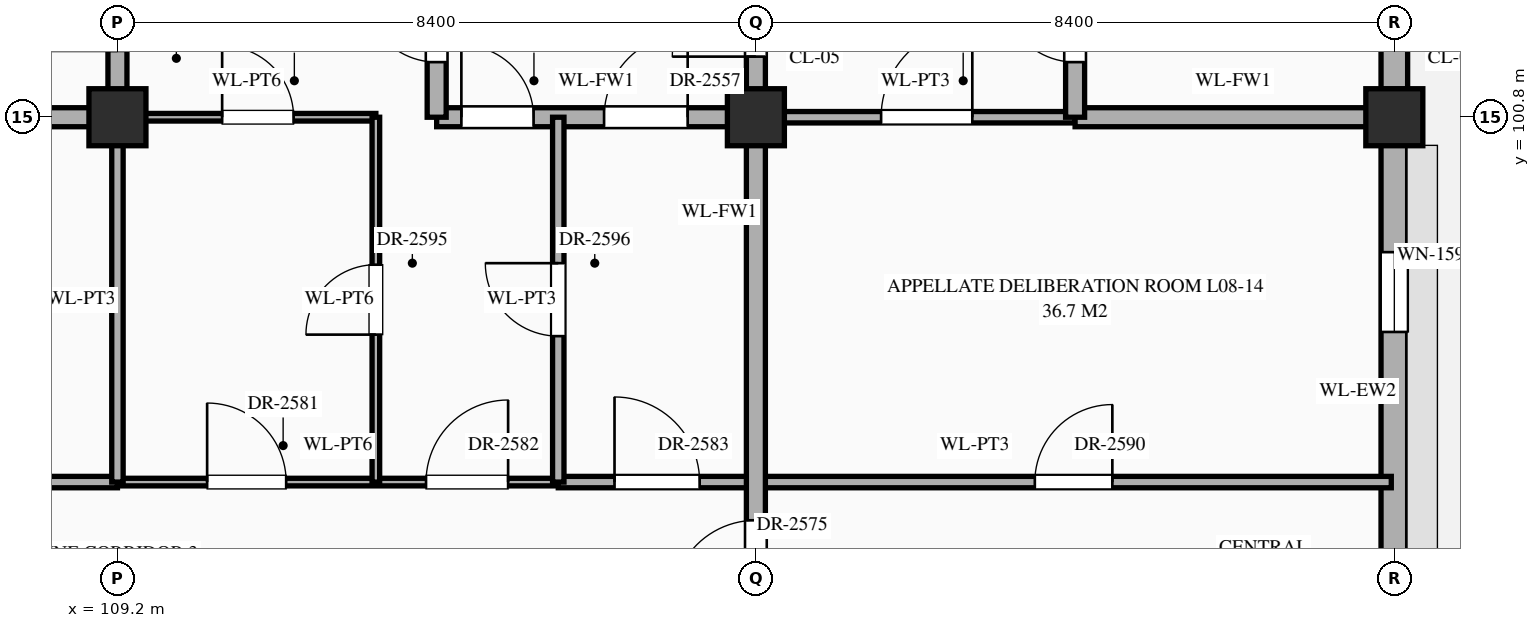
"""IFC4 building model, lengths in metres.
Left out: names, types, materials, properties, quantities, classifications, styles, units other than length and angle.
Written with IfcOpenShell. Run it as: python <this file> out.ifc"""

import sys

from ifc_helpers import new_model, si_unit, direction, frame, frame_2d, origin, origin_2d, place, context, subcontext, project, spatial, rectangle, extrude, element, fill, save


model = new_model("IFC4")
c1 = context("Model", 3, precision=1e-05, world=origin(), true_north=direction((0.0, 1.0)))
c2 = subcontext(c1, "Body", "Model", "MODEL_VIEW")
j1 = project(units=[si_unit("LENGTHUNIT", "METRE"), si_unit("PLANEANGLEUNIT", "RADIAN")], contexts=[c1])
p1 = place(None, origin())
s1 = spatial("IfcSite", under=j1, at=p1, CompositionType="ELEMENT")
p2 = place(p1, origin())
s2 = spatial("IfcBuilding", under=s1, at=p2, CompositionType="ELEMENT")
p3 = place(p2, frame((0.0, 0.0, 35.1)))
s3 = spatial("IfcBuildingStorey", under=s2, at=p3, CompositionType="ELEMENT", Elevation=35.1)
for number, where, z_axis, x_axis in (
    (1, (109.2, 100.8, 0.0), (0.0, 0.0, 1.0), (1.0, 0.0, 0.0)),
    (2, (117.6, 100.8, 0.0), (0.0, 0.0, 1.0), (1.0, 0.0, 0.0)),
    (3, (126.0, 100.8, 0.0), (0.0, 0.0, 1.0), (1.0, 0.0, 0.0)),
):
    element("IfcColumn", number, at=place(p3, frame(where, z_axis=z_axis, x_axis=x_axis)), inside=s3, PredefinedType="COLUMN", context=c2, shape_type="SweptSolid", body=[
        extrude(rectangle(XDim=0.75, YDim=0.75, at=origin_2d()), origin(), (0.0, 0.0, 1.0), 4.2),
    ])
p4 = place(p3, frame((126.0, 93.97, 0.0), z_axis=(0.0, 0.0, 1.0), x_axis=(0.0, 1.0, 0.0)))
e4 = element("IfcWall", 4, at=p4, inside=s3, PredefinedType="STANDARD", context=c2, shape_type="SweptSolid", body=[
    extrude(rectangle(XDim=6.46, YDim=0.35, at=frame_2d((3.23, 0.0))), origin(), (0.0, 0.0, 1.0), 3.3),
])
p5 = place(p4, frame((4.005, 0.0, 0.85)))
e5 = element("IfcOpeningElement", 5, at=p5, cuts=e4, PredefinedType="OPENING", context=c2, shape_type="SweptSolid", body=[
    extrude(rectangle(XDim=1.05, YDim=1.56, at=frame_2d((0.525, 0.78))), frame((0.0, 0.187, 0.0), z_axis=(0.0, -1.0, 0.0), x_axis=(1.0, 0.0, 0.0)), (0.0, 0.0, 1.0), 0.374),
])
p6 = place(p3, frame((126.0, 101.17, 0.0), z_axis=(0.0, 0.0, 1.0), x_axis=(0.0, 1.0, 0.0)))
e6 = element("IfcWall", 6, at=p6, inside=s3, PredefinedType="STANDARD", context=c2, shape_type="SweptSolid", body=[
    extrude(rectangle(XDim=6.46, YDim=0.35, at=frame_2d((3.23, 0.0))), origin(), (0.0, 0.0, 1.0), 3.3),
])
p7 = place(p3, frame((89.8, 96.0, 0.0), z_axis=(0.0, 0.0, 1.0), x_axis=(1.0, 0.0, 0.0)))
e7 = element("IfcWall", 7, at=p7, inside=s3, PredefinedType="STANDARD", context=c2, shape_type="SweptSolid", body=[
    extrude(rectangle(XDim=19.4, YDim=0.15, at=frame_2d((9.7, 0.0))), origin(), (0.0, 0.0, 1.0), 3.95),
])
p8 = place(p7, frame((0.84, 0.0, 0.0)))
e8 = element("IfcOpeningElement", 8, at=p8, cuts=e7, PredefinedType="OPENING", context=c2, shape_type="SweptSolid", body=[
    extrude(rectangle(XDim=0.92, YDim=2.15, at=frame_2d((0.46, 1.075))), frame((0.0, 0.087, 0.0), z_axis=(0.0, -1.0, 0.0), x_axis=(1.0, 0.0, 0.0)), (0.0, 0.0, 1.0), 0.174),
])
p9 = place(p7, frame((6.32, 0.0, 0.0)))
e9 = element("IfcOpeningElement", 9, at=p9, cuts=e7, PredefinedType="OPENING", context=c2, shape_type="SweptSolid", body=[
    extrude(rectangle(XDim=0.96, YDim=2.2, at=frame_2d((0.48, 1.1))), frame((0.0, 0.087, 0.0), z_axis=(0.0, -1.0, 0.0), x_axis=(1.0, 0.0, 0.0)), (0.0, 0.0, 1.0), 0.174),
])
p10 = place(p7, frame((14.7, 0.0, 0.0)))
e10 = element("IfcOpeningElement", 10, at=p10, cuts=e7, PredefinedType="OPENING", context=c2, shape_type="SweptSolid", body=[
    extrude(rectangle(XDim=1.0, YDim=2.25, at=frame_2d((0.5, 1.125))), frame((0.0, 0.087, 0.0), z_axis=(0.0, -1.0, 0.0), x_axis=(1.0, 0.0, 0.0)), (0.0, 0.0, 1.0), 0.174),
])
p11 = place(p3, frame((109.2, 96.0, 0.0), z_axis=(0.0, 0.0, 1.0), x_axis=(1.0, 0.0, 0.0)))
e11 = element("IfcWall", 11, at=p11, inside=s3, PredefinedType="STANDARD", context=c2, shape_type="SweptSolid", body=[
    extrude(rectangle(XDim=5.8, YDim=0.1, at=frame_2d((2.9, 0.0))), origin(), (0.0, 0.0, 1.0), 3.95),
])
p12 = place(p11, frame((1.18, 0.0, 0.0)))
e12 = element("IfcOpeningElement", 12, at=p12, cuts=e11, PredefinedType="OPENING", context=c2, shape_type="SweptSolid", body=[
    extrude(rectangle(XDim=1.04, YDim=2.2, at=frame_2d((0.52, 1.1))), frame((0.0, 0.062, 0.0), z_axis=(0.0, -1.0, 0.0), x_axis=(1.0, 0.0, 0.0)), (0.0, 0.0, 1.0), 0.124),
])
p13 = place(p11, frame((4.06, 0.0, 0.0)))
e13 = element("IfcOpeningElement", 13, at=p13, cuts=e11, PredefinedType="OPENING", context=c2, shape_type="SweptSolid", body=[
    extrude(rectangle(XDim=1.08, YDim=2.25, at=frame_2d((0.54, 1.125))), frame((0.0, 0.062, 0.0), z_axis=(0.0, -1.0, 0.0), x_axis=(1.0, 0.0, 0.0)), (0.0, 0.0, 1.0), 0.124),
])
p14 = place(p3, frame((115.0, 96.0, 0.0), z_axis=(0.0, 0.0, 1.0), x_axis=(1.0, 0.0, 0.0)))
e14 = element("IfcWall", 14, at=p14, inside=s3, PredefinedType="STANDARD", context=c2, shape_type="SweptSolid", body=[
    extrude(rectangle(XDim=10.96, YDim=0.15, at=frame_2d((5.48, 0.0))), origin(), (0.0, 0.0, 1.0), 3.95),
])
p15 = place(p14, frame((0.74, 0.0, 0.0)))
e15 = element("IfcOpeningElement", 15, at=p15, cuts=e14, PredefinedType="OPENING", context=c2, shape_type="SweptSolid", body=[
    extrude(rectangle(XDim=1.12, YDim=2.25, at=frame_2d((0.56, 1.125))), frame((0.0, 0.087, 0.0), z_axis=(0.0, -1.0, 0.0), x_axis=(1.0, 0.0, 0.0)), (0.0, 0.0, 1.0), 0.174),
])
p16 = place(p14, frame((6.27, 0.0, 0.0)))
e16 = element("IfcOpeningElement", 16, at=p16, cuts=e14, PredefinedType="OPENING", context=c2, shape_type="SweptSolid", body=[
    extrude(rectangle(XDim=1.02, YDim=2.4, at=frame_2d((0.51, 1.2))), frame((0.0, 0.087, 0.0), z_axis=(0.0, -1.0, 0.0), x_axis=(1.0, 0.0, 0.0)), (0.0, 0.0, 1.0), 0.174),
])
p17 = place(p3, frame((96.6, 100.8, 0.0), z_axis=(0.0, 0.0, 1.0), x_axis=(1.0, 0.0, 0.0)))
e17 = element("IfcWall", 17, at=p17, inside=s3, PredefinedType="STANDARD", context=c2, shape_type="SweptSolid", body=[
    extrude(rectangle(XDim=12.6, YDim=0.25, at=frame_2d((6.3, 0.0))), origin(), (0.0, 0.0, 1.0), 3.1),
])
p18 = place(p17, frame((7.85, 0.0, 0.0)))
e18 = element("IfcOpeningElement", 18, at=p18, cuts=e17, PredefinedType="OPENING", context=c2, shape_type="SweptSolid", body=[
    extrude(rectangle(XDim=1.1, YDim=2.2, at=frame_2d((0.55, 1.1))), frame((0.0, 0.137, 0.0), z_axis=(0.0, -1.0, 0.0), x_axis=(1.0, 0.0, 0.0)), (0.0, 0.0, 1.0), 0.274),
])
p19 = place(p3, frame((109.2, 100.8, 0.0), z_axis=(0.0, 0.0, 1.0), x_axis=(1.0, 0.0, 0.0)))
e19 = element("IfcWall", 19, at=p19, inside=s3, PredefinedType="STANDARD", context=c2, shape_type="SweptSolid", body=[
    extrude(rectangle(XDim=3.4, YDim=0.1, at=frame_2d((1.7, 0.0))), origin(), (0.0, 0.0, 1.0), 3.1),
])
p20 = place(p19, frame((1.377, 0.0, 0.0)))
e20 = element("IfcOpeningElement", 20, at=p20, cuts=e19, PredefinedType="OPENING", context=c2, shape_type="SweptSolid", body=[
    extrude(rectangle(XDim=0.94, YDim=2.3, at=frame_2d((0.47, 1.15))), frame((0.0, 0.062, 0.0), z_axis=(0.0, -1.0, 0.0), x_axis=(1.0, 0.0, 0.0)), (0.0, 0.0, 1.0), 0.124),
])
p21 = place(p3, frame((113.4, 100.8, 0.0), z_axis=(0.0, 0.0, 1.0), x_axis=(1.0, 0.0, 0.0)))
e21 = element("IfcWall", 21, at=p21, inside=s3, PredefinedType="STANDARD", context=c2, shape_type="SweptSolid", body=[
    extrude(rectangle(XDim=4.2, YDim=0.25, at=frame_2d((2.1, 0.0))), origin(), (0.0, 0.0, 1.0), 3.1),
])
p22 = place(p21, frame((0.325, 0.0, 0.0)))
e22 = element("IfcOpeningElement", 22, at=p22, cuts=e21, PredefinedType="OPENING", context=c2, shape_type="SweptSolid", body=[
    extrude(rectangle(XDim=0.95, YDim=2.15, at=frame_2d((0.475, 1.075))), frame((0.0, 0.137, 0.0), z_axis=(0.0, -1.0, 0.0), x_axis=(1.0, 0.0, 0.0)), (0.0, 0.0, 1.0), 0.274),
])
p23 = place(p21, frame((2.202, 0.0, 0.0)))
e23 = element("IfcOpeningElement", 23, at=p23, cuts=e21, PredefinedType="OPENING", context=c2, shape_type="SweptSolid", body=[
    extrude(rectangle(XDim=1.1, YDim=2.2, at=frame_2d((0.55, 1.1))), frame((0.0, 0.137, 0.0), z_axis=(0.0, -1.0, 0.0), x_axis=(1.0, 0.0, 0.0)), (0.0, 0.0, 1.0), 0.274),
])
p24 = place(p3, frame((117.6, 100.8, 0.0), z_axis=(0.0, 0.0, 1.0), x_axis=(1.0, 0.0, 0.0)))
e24 = element("IfcWall", 24, at=p24, inside=s3, PredefinedType="STANDARD", context=c2, shape_type="SweptSolid", body=[
    extrude(rectangle(XDim=4.2, YDim=0.15, at=frame_2d((2.1, 0.0))), origin(), (0.0, 0.0, 1.0), 3.1),
])
p25 = place(p24, frame((1.647, 0.0, 0.0)))
e25 = element("IfcOpeningElement", 25, at=p25, cuts=e24, PredefinedType="OPENING", context=c2, shape_type="SweptSolid", body=[
    extrude(rectangle(XDim=1.2, YDim=2.35, at=frame_2d((0.6, 1.175))), frame((0.0, 0.087, 0.0), z_axis=(0.0, -1.0, 0.0), x_axis=(1.0, 0.0, 0.0)), (0.0, 0.0, 1.0), 0.174),
])
p26 = place(p3, frame((121.8, 100.8, 0.0), z_axis=(0.0, 0.0, 1.0), x_axis=(1.0, 0.0, 0.0)))
e26 = element("IfcWall", 26, at=p26, inside=s3, PredefinedType="STANDARD", context=c2, shape_type="SweptSolid", body=[
    extrude(rectangle(XDim=4.16, YDim=0.25, at=frame_2d((2.08, 0.0))), origin(), (0.0, 0.0, 1.0), 3.1),
])
p27 = place(p3, frame((109.2, 96.0, 0.0), z_axis=(0.0, 0.0, 1.0), x_axis=(0.0, 1.0, 0.0)))
e27 = element("IfcWall", 27, at=p27, inside=s3, PredefinedType="STANDARD", context=c2, shape_type="SweptSolid", body=[
    extrude(rectangle(XDim=4.8, YDim=0.15, at=frame_2d((2.4, 0.0))), origin(), (0.0, 0.0, 1.0), 3.2),
])
p28 = place(p3, frame((109.2, 100.8, 0.0), z_axis=(0.0, 0.0, 1.0), x_axis=(0.0, 1.0, 0.0)))
e28 = element("IfcWall", 28, at=p28, inside=s3, PredefinedType="STANDARD", context=c2, shape_type="SweptSolid", body=[
    extrude(rectangle(XDim=2.4, YDim=0.25, at=frame_2d((1.2, 0.0))), origin(), (0.0, 0.0, 1.0), 3.2),
])
p29 = place(p28, frame((0.873, 0.0, 0.0)))
e29 = element("IfcOpeningElement", 29, at=p29, cuts=e28, PredefinedType="OPENING", context=c2, shape_type="SweptSolid", body=[
    extrude(rectangle(XDim=0.95, YDim=2.15, at=frame_2d((0.475, 1.075))), frame((0.0, 0.137, 0.0), z_axis=(0.0, -1.0, 0.0), x_axis=(1.0, 0.0, 0.0)), (0.0, 0.0, 1.0), 0.274),
])
p30 = place(p3, frame((112.6, 96.0, 0.0), z_axis=(0.0, 0.0, 1.0), x_axis=(0.0, 1.0, 0.0)))
e30 = element("IfcWall", 30, at=p30, inside=s3, PredefinedType="STANDARD", context=c2, shape_type="SweptSolid", body=[
    extrude(rectangle(XDim=4.8, YDim=0.1, at=frame_2d((2.4, 0.0))), origin(), (0.0, 0.0, 1.0), 3.95),
])
p31 = place(p30, frame((1.94, 0.0, 0.0)))
e31 = element("IfcOpeningElement", 31, at=p31, cuts=e30, PredefinedType="OPENING", context=c2, shape_type="SweptSolid", body=[
    extrude(rectangle(XDim=0.92, YDim=2.15, at=frame_2d((0.46, 1.075))), frame((0.0, 0.062, 0.0), z_axis=(0.0, -1.0, 0.0), x_axis=(1.0, 0.0, 0.0)), (0.0, 0.0, 1.0), 0.124),
])
p32 = place(p3, frame((113.4, 100.8, 0.0), z_axis=(0.0, 0.0, 1.0), x_axis=(0.0, 1.0, 0.0)))
e32 = element("IfcWall", 32, at=p32, inside=s3, PredefinedType="STANDARD", context=c2, shape_type="SweptSolid", body=[
    extrude(rectangle(XDim=3.6, YDim=0.25, at=frame_2d((1.8, 0.0))), origin(), (0.0, 0.0, 1.0), 3.95),
])
p33 = place(p32, frame((0.725, 0.0, 0.0)))
e33 = element("IfcOpeningElement", 33, at=p33, cuts=e32, PredefinedType="OPENING", context=c2, shape_type="SweptSolid", body=[
    extrude(rectangle(XDim=0.95, YDim=2.15, at=frame_2d((0.475, 1.075))), frame((0.0, 0.137, 0.0), z_axis=(0.0, -1.0, 0.0), x_axis=(1.0, 0.0, 0.0)), (0.0, 0.0, 1.0), 0.274),
])
p34 = place(p3, frame((115.0, 96.0, 0.0), z_axis=(0.0, 0.0, 1.0), x_axis=(0.0, 1.0, 0.0)))
e34 = element("IfcWall", 34, at=p34, inside=s3, PredefinedType="STANDARD", context=c2, shape_type="SweptSolid", body=[
    extrude(rectangle(XDim=4.8, YDim=0.15, at=frame_2d((2.4, 0.0))), origin(), (0.0, 0.0, 1.0), 3.95),
])
p35 = place(p34, frame((1.92, 0.0, 0.0)))
e35 = element("IfcOpeningElement", 35, at=p35, cuts=e34, PredefinedType="OPENING", context=c2, shape_type="SweptSolid", body=[
    extrude(rectangle(XDim=0.96, YDim=2.2, at=frame_2d((0.48, 1.1))), frame((0.0, 0.087, 0.0), z_axis=(0.0, -1.0, 0.0), x_axis=(1.0, 0.0, 0.0)), (0.0, 0.0, 1.0), 0.174),
])
p36 = place(p3, frame((117.6, 91.2, 0.0), z_axis=(0.0, 0.0, 1.0), x_axis=(0.0, 1.0, 0.0)))
e36 = element("IfcWall", 36, at=p36, inside=s3, PredefinedType="STANDARD", context=c2, shape_type="SweptSolid", body=[
    extrude(rectangle(XDim=13.2, YDim=0.25, at=frame_2d((6.6, 0.0))), origin(), (0.0, 0.0, 1.0), 3.2),
])
p37 = place(p36, frame((0.552, 0.0, 0.0)))
e37 = element("IfcOpeningElement", 37, at=p37, cuts=e36, PredefinedType="OPENING", context=c2, shape_type="SweptSolid", body=[
    extrude(rectangle(XDim=1.0, YDim=2.2, at=frame_2d((0.5, 1.1))), frame((0.0, 0.137, 0.0), z_axis=(0.0, -1.0, 0.0), x_axis=(1.0, 0.0, 0.0)), (0.0, 0.0, 1.0), 0.274),
])
p38 = place(p36, frame((10.397, 0.0, 0.0)))
e38 = element("IfcOpeningElement", 38, at=p38, cuts=e36, PredefinedType="OPENING", context=c2, shape_type="SweptSolid", body=[
    extrude(rectangle(XDim=1.1, YDim=2.2, at=frame_2d((0.55, 1.1))), frame((0.0, 0.137, 0.0), z_axis=(0.0, -1.0, 0.0), x_axis=(1.0, 0.0, 0.0)), (0.0, 0.0, 1.0), 0.274),
])
p39 = place(p36, frame((3.198, 0.0, 0.0)))
e39 = element("IfcOpeningElement", 39, at=p39, cuts=e36, PredefinedType="OPENING", context=c2, shape_type="SweptSolid", body=[
    extrude(rectangle(XDim=1.1, YDim=2.2, at=frame_2d((0.55, 1.1))), frame((0.0, 0.137, 0.0), z_axis=(0.0, -1.0, 0.0), x_axis=(1.0, 0.0, 0.0)), (0.0, 0.0, 1.0), 0.274),
])
p40 = place(p3, frame((121.8, 100.8, 0.0), z_axis=(0.0, 0.0, 1.0), x_axis=(0.0, 1.0, 0.0)))
e40 = element("IfcWall", 40, at=p40, inside=s3, PredefinedType="STANDARD", context=c2, shape_type="SweptSolid", body=[
    extrude(rectangle(XDim=3.6, YDim=0.25, at=frame_2d((1.8, 0.0))), origin(), (0.0, 0.0, 1.0), 3.6),
])
p41 = place(p40, frame((0.725, 0.0, 0.0)))
e41 = element("IfcOpeningElement", 41, at=p41, cuts=e40, PredefinedType="OPENING", context=c2, shape_type="SweptSolid", body=[
    extrude(rectangle(XDim=0.95, YDim=2.15, at=frame_2d((0.475, 1.075))), frame((0.0, 0.137, 0.0), z_axis=(0.0, -1.0, 0.0), x_axis=(1.0, 0.0, 0.0)), (0.0, 0.0, 1.0), 0.274),
])
p42 = place(p5, origin())
e42 = element("IfcWindow", 42, at=p42, inside=s3, PartitioningType="SINGLE_PANEL", PredefinedType="WINDOW", context=c2, shape_type="SweptSolid", body=[
    extrude(rectangle(XDim=1.05, YDim=1.56, at=frame_2d((0.525, 0.78))), frame((0.0, 0.03, 0.0), z_axis=(0.0, -1.0, 0.0), x_axis=(1.0, 0.0, 0.0)), (0.0, 0.0, 1.0), 0.06),
])
fill(e5, e42)
p43 = place(p41, origin())
e43 = element("IfcDoor", 43, at=p43, inside=s3, OperationType="SINGLE_SWING_RIGHT", PredefinedType="DOOR", context=c2, shape_type="SweptSolid", body=[
    extrude(rectangle(XDim=0.95, YDim=2.15, at=frame_2d((0.475, 1.075))), frame((0.0, 0.025, 0.0), z_axis=(0.0, -1.0, 0.0), x_axis=(1.0, 0.0, 0.0)), (0.0, 0.0, 1.0), 0.05),
])
fill(e41, e43)
p44 = place(p38, origin())
e44 = element("IfcDoor", 44, at=p44, inside=s3, OperationType="SINGLE_SWING_LEFT", PredefinedType="DOOR", context=c2, shape_type="SweptSolid", body=[
    extrude(rectangle(XDim=1.1, YDim=2.2, at=frame_2d((0.55, 1.1))), frame((0.0, 0.025, 0.0), z_axis=(0.0, -1.0, 0.0), x_axis=(1.0, 0.0, 0.0)), (0.0, 0.0, 1.0), 0.05),
])
fill(e38, e44)
p45 = place(p25, origin())
e45 = element("IfcDoor", 45, at=p45, inside=s3, OperationType="SINGLE_SWING_RIGHT", PredefinedType="DOOR", context=c2, shape_type="SweptSolid", body=[
    extrude(rectangle(XDim=1.2, YDim=2.35, at=frame_2d((0.6, 1.175))), frame((0.0, 0.025, 0.0), z_axis=(0.0, -1.0, 0.0), x_axis=(1.0, 0.0, 0.0)), (0.0, 0.0, 1.0), 0.05),
])
fill(e25, e45)
p46 = place(p33, origin())
e46 = element("IfcDoor", 46, at=p46, inside=s3, OperationType="SINGLE_SWING_RIGHT", PredefinedType="DOOR", context=c2, shape_type="SweptSolid", body=[
    extrude(rectangle(XDim=0.95, YDim=2.15, at=frame_2d((0.475, 1.075))), frame((0.0, 0.025, 0.0), z_axis=(0.0, -1.0, 0.0), x_axis=(1.0, 0.0, 0.0)), (0.0, 0.0, 1.0), 0.05),
])
fill(e33, e46)
p47 = place(p20, origin())
e47 = element("IfcDoor", 47, at=p47, inside=s3, OperationType="SINGLE_SWING_LEFT", PredefinedType="DOOR", context=c2, shape_type="SweptSolid", body=[
    extrude(rectangle(XDim=0.94, YDim=2.3, at=frame_2d((0.47, 1.15))), frame((0.0, 0.025, 0.0), z_axis=(0.0, -1.0, 0.0), x_axis=(1.0, 0.0, 0.0)), (0.0, 0.0, 1.0), 0.05),
])
fill(e20, e47)
p48 = place(p22, origin())
e48 = element("IfcDoor", 48, at=p48, inside=s3, OperationType="SINGLE_SWING_LEFT", PredefinedType="DOOR", context=c2, shape_type="SweptSolid", body=[
    extrude(rectangle(XDim=0.95, YDim=2.15, at=frame_2d((0.475, 1.075))), frame((0.0, 0.025, 0.0), z_axis=(0.0, -1.0, 0.0), x_axis=(1.0, 0.0, 0.0)), (0.0, 0.0, 1.0), 0.05),
])
fill(e22, e48)
p49 = place(p23, origin())
e49 = element("IfcDoor", 49, at=p49, inside=s3, OperationType="SINGLE_SWING_RIGHT", PredefinedType="DOOR", context=c2, shape_type="SweptSolid", body=[
    extrude(rectangle(XDim=1.1, YDim=2.2, at=frame_2d((0.55, 1.1))), frame((0.0, 0.025, 0.0), z_axis=(0.0, -1.0, 0.0), x_axis=(1.0, 0.0, 0.0)), (0.0, 0.0, 1.0), 0.05),
])
fill(e23, e49)
p50 = place(p39, origin())
e50 = element("IfcDoor", 50, at=p50, inside=s3, OperationType="SINGLE_SWING_LEFT", PredefinedType="DOOR", context=c2, shape_type="SweptSolid", body=[
    extrude(rectangle(XDim=1.1, YDim=2.2, at=frame_2d((0.55, 1.1))), frame((0.0, 0.025, 0.0), z_axis=(0.0, -1.0, 0.0), x_axis=(1.0, 0.0, 0.0)), (0.0, 0.0, 1.0), 0.05),
])
fill(e39, e50)
p51 = place(p12, origin())
e51 = element("IfcDoor", 51, at=p51, inside=s3, OperationType="SINGLE_SWING_LEFT", PredefinedType="DOOR", context=c2, shape_type="SweptSolid", body=[
    extrude(rectangle(XDim=1.04, YDim=2.2, at=frame_2d((0.52, 1.1))), frame((0.0, 0.025, 0.0), z_axis=(0.0, -1.0, 0.0), x_axis=(1.0, 0.0, 0.0)), (0.0, 0.0, 1.0), 0.05),
])
fill(e12, e51)
p52 = place(p13, origin())
e52 = element("IfcDoor", 52, at=p52, inside=s3, OperationType="SINGLE_SWING_RIGHT", PredefinedType="DOOR", context=c2, shape_type="SweptSolid", body=[
    extrude(rectangle(XDim=1.08, YDim=2.25, at=frame_2d((0.54, 1.125))), frame((0.0, 0.025, 0.0), z_axis=(0.0, -1.0, 0.0), x_axis=(1.0, 0.0, 0.0)), (0.0, 0.0, 1.0), 0.05),
])
fill(e13, e52)
p53 = place(p15, origin())
e53 = element("IfcDoor", 53, at=p53, inside=s3, OperationType="SINGLE_SWING_LEFT", PredefinedType="DOOR", context=c2, shape_type="SweptSolid", body=[
    extrude(rectangle(XDim=1.12, YDim=2.25, at=frame_2d((0.56, 1.125))), frame((0.0, 0.025, 0.0), z_axis=(0.0, -1.0, 0.0), x_axis=(1.0, 0.0, 0.0)), (0.0, 0.0, 1.0), 0.05),
])
fill(e15, e53)
p54 = place(p16, origin())
e54 = element("IfcDoor", 54, at=p54, inside=s3, OperationType="SINGLE_SWING_RIGHT", PredefinedType="DOOR", context=c2, shape_type="SweptSolid", body=[
    extrude(rectangle(XDim=1.02, YDim=2.4, at=frame_2d((0.51, 1.2))), frame((0.0, 0.025, 0.0), z_axis=(0.0, -1.0, 0.0), x_axis=(1.0, 0.0, 0.0)), (0.0, 0.0, 1.0), 0.05),
])
fill(e16, e54)
p55 = place(p31, origin())
e55 = element("IfcDoor", 55, at=p55, inside=s3, OperationType="SINGLE_SWING_LEFT", PredefinedType="DOOR", context=c2, shape_type="SweptSolid", body=[
    extrude(rectangle(XDim=0.92, YDim=2.15, at=frame_2d((0.46, 1.075))), frame((0.0, 0.025, 0.0), z_axis=(0.0, -1.0, 0.0), x_axis=(1.0, 0.0, 0.0)), (0.0, 0.0, 1.0), 0.05),
])
fill(e31, e55)
p56 = place(p35, origin())
e56 = element("IfcDoor", 56, at=p56, inside=s3, OperationType="SINGLE_SWING_RIGHT", PredefinedType="DOOR", context=c2, shape_type="SweptSolid", body=[
    extrude(rectangle(XDim=0.96, YDim=2.2, at=frame_2d((0.48, 1.1))), frame((0.0, 0.025, 0.0), z_axis=(0.0, -1.0, 0.0), x_axis=(1.0, 0.0, 0.0)), (0.0, 0.0, 1.0), 0.05),
])
fill(e35, e56)
save(model, sys.argv[1])
